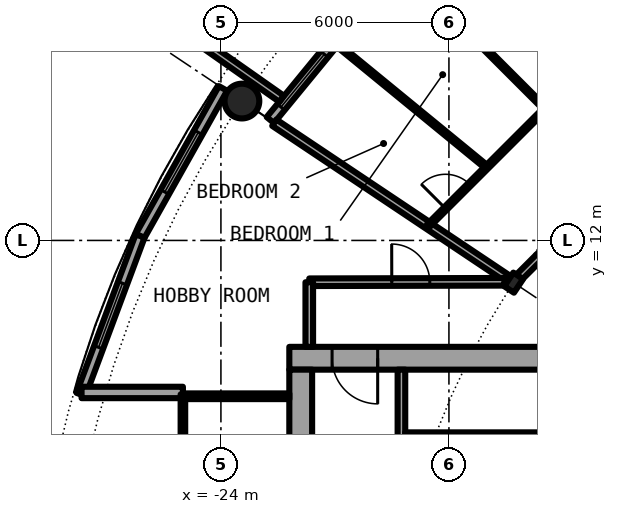
"""IFC4 building model, lengths in metres.
Left out: names, types, materials, properties, quantities, classifications, styles, units other than length and angle.
Written with IfcOpenShell. Run it as: python <this file> out.ifc"""

import sys

from ifc_helpers import new_model, si_unit, direction, frame, frame_2d, origin, origin_2d, place, context, subcontext, project, spatial, rectangle, hollow_circle, i_section, extrude, element, fill, save


model = new_model("IFC4")
c1 = context("Model", 3, precision=1e-05, world=origin(), true_north=direction((0.0, 1.0)))
c2 = subcontext(c1, "Body", "Model", "MODEL_VIEW")
j1 = project(units=[si_unit("LENGTHUNIT", "METRE"), si_unit("PLANEANGLEUNIT", "RADIAN")], contexts=[c1])
p1 = place(None, origin())
s1 = spatial("IfcSite", under=j1, at=p1, CompositionType="ELEMENT")
p2 = place(p1, origin())
s2 = spatial("IfcBuilding", under=s1, at=p2, CompositionType="ELEMENT")
p3 = place(p2, frame((0.0, 0.0, 120.8)))
s3 = spatial("IfcBuildingStorey", under=s2, at=p3, CompositionType="ELEMENT", Elevation=120.8)
p4 = place(p3, frame((-23.448, 15.667, 0.0), z_axis=(0.0, 0.0, 1.0), x_axis=(1.0, 0.0, 0.0)))
e1 = element("IfcColumn", 1, at=p4, inside=s3, PredefinedType="COLUMN", context=c2, shape_type="SweptSolid", body=[
    extrude(hollow_circle(Radius=0.457, WallThickness=0.04, at=origin_2d()), origin(), (0.0, 0.0, 1.0), 3.05),
])
p5 = place(p3, frame((-16.297, 10.889, 0.0), z_axis=(0.0, 0.0, 1.0), x_axis=(-0.831469612303, 0.55557023302, 0.0)))
e2 = element("IfcColumn", 2, at=p5, inside=s3, PredefinedType="COLUMN", context=c2, shape_type="SweptSolid", body=[
    extrude(i_section(OverallWidth=0.307, OverallDepth=0.432, WebThickness=0.021, FlangeThickness=0.04, FilletRadius=0.027, at=origin_2d()), origin(), (0.0, 0.0, 1.0), 3.05),
])
p6 = place(p3, frame((-19.304, 19.304, 0.0), z_axis=(0.0, 0.0, 1.0), x_axis=(-0.634382322723, -0.773019449054, 0.0)))
e3 = element("IfcWall", 3, at=p6, inside=s3, PredefinedType="SOLIDWALL", context=c2, shape_type="SweptSolid", body=[
    extrude(rectangle(XDim=5.352, YDim=0.25, at=frame_2d((2.676, 0.0))), origin(), (0.0, 0.0, 1.0), 2.7),
])
p7 = place(p6, frame((0.841, 0.0, 0.0)))
e4 = element("IfcOpeningElement", 4, at=p7, cuts=e3, PredefinedType="OPENING", context=c2, shape_type="SweptSolid", body=[
    extrude(rectangle(XDim=1.0, YDim=2.2, at=frame_2d((0.5, 1.1))), frame((0.0, 0.135, 0.0), z_axis=(0.0, -1.0, 0.0), x_axis=(1.0, 0.0, 0.0)), (0.0, 0.0, 1.0), 0.27),
])
p8 = place(p6, frame((3.111, 0.0, 0.3)))
e5 = element("IfcOpeningElement", 5, at=p8, cuts=e3, PredefinedType="OPENING", context=c2, shape_type="SweptSolid", body=[
    extrude(rectangle(XDim=1.8, YDim=2.1, at=frame_2d((0.9, 1.05))), frame((0.0, 0.135, 0.0), z_axis=(0.0, -1.0, 0.0), x_axis=(1.0, 0.0, 0.0)), (0.0, 0.0, 1.0), 0.27),
])
p9 = place(p3, frame((-22.402, 15.726, -0.03), z_axis=(0.0, 0.0, 1.0), x_axis=(-0.818275399393, 0.574826383135, 0.0)))
e6 = element("IfcWall", 6, at=p9, inside=s3, PredefinedType="SOLIDWALL", context=c2, shape_type="SweptSolid", body=[
    extrude(rectangle(XDim=2.929, YDim=0.2, at=frame_2d((1.465, 0.0))), origin(), (0.0, 0.0, 1.0), 2.73),
])
p10 = place(p3, frame((-23.946, 16.0, 0.0), z_axis=(0.0, 0.0, 1.0), x_axis=(-0.489696356642, -0.871893042919, 0.0)))
e7 = element("IfcWall", 7, at=p10, inside=s3, PredefinedType="SOLIDWALL", context=c2, shape_type="SweptSolid", body=[
    extrude(rectangle(XDim=4.454, YDim=0.25, at=frame_2d((2.227, 0.0))), origin(), (0.0, 0.0, 1.0), 2.7),
])
p11 = place(p10, frame((1.327, 0.0, 0.3)))
e8 = element("IfcOpeningElement", 8, at=p11, cuts=e7, PredefinedType="OPENING", context=c2, shape_type="SweptSolid", body=[
    extrude(rectangle(XDim=1.8, YDim=2.1, at=frame_2d((0.9, 1.05))), frame((0.0, 0.135, 0.0), z_axis=(0.0, -1.0, 0.0), x_axis=(1.0, 0.0, 0.0)), (0.0, 0.0, 1.0), 0.27),
])
p12 = place(p3, frame((-26.127, 12.117, 0.0), z_axis=(0.0, 0.0, 1.0), x_axis=(-0.349247811493, -0.937030397675, 0.0)))
e9 = element("IfcWall", 9, at=p12, inside=s3, PredefinedType="SOLIDWALL", context=c2, shape_type="SweptSolid", body=[
    extrude(rectangle(XDim=4.452, YDim=0.25, at=frame_2d((2.226, 0.0))), origin(), (0.0, 0.0, 1.0), 2.7),
])
p13 = place(p12, frame((1.327, 0.0, 0.3)))
e10 = element("IfcOpeningElement", 10, at=p13, cuts=e9, PredefinedType="OPENING", context=c2, shape_type="SweptSolid", body=[
    extrude(rectangle(XDim=1.8, YDim=2.1, at=frame_2d((0.9, 1.05))), frame((0.0, 0.135, 0.0), z_axis=(0.0, -1.0, 0.0), x_axis=(1.0, 0.0, 0.0)), (0.0, 0.0, 1.0), 0.27),
])
p14 = place(p3, frame((-25.0, 8.0, 0.0), z_axis=(0.0, 0.0, 1.0), x_axis=(-1.0, 0.0, 0.0)))
e11 = element("IfcWall", 11, at=p14, inside=s3, PredefinedType="SOLIDWALL", context=c2, shape_type="SweptSolid", body=[
    extrude(rectangle(XDim=2.667, YDim=0.3, at=frame_2d((1.333, 0.0))), origin(), (0.0, 0.0, 1.0), 2.7),
])
p15 = place(p3, frame((-8.4, 8.9, 0.0), z_axis=(0.0, 0.0, 1.0), x_axis=(-1.0, 0.0, 0.0)))
e12 = element("IfcWall", 12, at=p15, inside=s3, PredefinedType="SHEAR", context=c2, shape_type="SweptSolid", body=[
    extrude(rectangle(XDim=13.8, YDim=0.6, at=frame_2d((6.9, 0.0))), origin(), (0.0, 0.0, 1.0), 3.05),
])
p16 = place(p15, frame((11.475, 0.0, 0.0)))
e13 = element("IfcOpeningElement", 13, at=p16, cuts=e12, PredefinedType="OPENING", context=c2, shape_type="SweptSolid", body=[
    extrude(rectangle(XDim=1.2, YDim=2.3, at=frame_2d((0.6, 1.15))), frame((0.0, 0.31, 0.0), z_axis=(0.0, -1.0, 0.0), x_axis=(1.0, 0.0, 0.0)), (0.0, 0.0, 1.0), 0.62),
])
p17 = place(p3, frame((-21.9, -8.6, 0.0), z_axis=(0.0, 0.0, 1.0), x_axis=(0.0, 1.0, 0.0)))
e14 = element("IfcWall", 14, at=p17, inside=s3, PredefinedType="SHEAR", context=c2, shape_type="SweptSolid", body=[
    extrude(rectangle(XDim=17.2, YDim=0.6, at=frame_2d((8.6, 0.0))), origin(), (0.0, 0.0, 1.0), 3.05),
])
p18 = place(p17, frame((7.7, 0.0, 0.0)))
e15 = element("IfcOpeningElement", 15, at=p18, cuts=e14, PredefinedType="OPENING", context=c2, shape_type="SweptSolid", body=[
    extrude(rectangle(XDim=1.8, YDim=2.3, at=frame_2d((0.9, 1.15))), frame((0.0, 0.31, 0.0), z_axis=(0.0, -1.0, 0.0), x_axis=(1.0, 0.0, 0.0)), (0.0, 0.0, 1.0), 0.62),
])
p19 = place(p3, frame((-19.25, 8.6, 0.0), z_axis=(0.0, 0.0, 1.0), x_axis=(0.0, -1.0, 0.0)))
e16 = element("IfcWall", 16, at=p19, inside=s3, PredefinedType="SOLIDWALL", context=c2, shape_type="SweptSolid", body=[
    extrude(rectangle(XDim=7.025, YDim=0.2, at=frame_2d((3.513, 0.0))), origin(), (0.0, 0.0, 1.0), 2.7),
])
p20 = place(p19, frame((2.35, 0.0, 0.0)))
e17 = element("IfcOpeningElement", 17, at=p20, cuts=e16, PredefinedType="OPENING", context=c2, shape_type="SweptSolid", body=[
    extrude(rectangle(XDim=1.1, YDim=2.3, at=frame_2d((0.55, 1.15))), frame((0.0, 0.11, 0.0), z_axis=(0.0, -1.0, 0.0), x_axis=(1.0, 0.0, 0.0)), (0.0, 0.0, 1.0), 0.22),
])
p21 = place(p3, frame((-15.45, 6.875, 0.0), z_axis=(0.0, 0.0, 1.0), x_axis=(-1.0, 0.0, 0.0)))
e18 = element("IfcWall", 18, at=p21, inside=s3, PredefinedType="PARTITIONING", context=c2, shape_type="SweptSolid", body=[
    extrude(rectangle(XDim=3.7, YDim=0.15, at=frame_2d((1.85, 0.0))), origin(), (0.0, 0.0, 1.0), 2.7),
])
p22 = place(p21, frame((1.4, 0.0, 0.0)))
e19 = element("IfcOpeningElement", 19, at=p22, cuts=e18, PredefinedType="OPENING", context=c2, shape_type="SweptSolid", body=[
    extrude(rectangle(XDim=0.9, YDim=2.3, at=frame_2d((0.45, 1.15))), frame((0.0, 0.085, 0.0), z_axis=(0.0, -1.0, 0.0), x_axis=(1.0, 0.0, 0.0)), (0.0, 0.0, 1.0), 0.17),
])
p23 = place(p3, frame((-22.2, 7.9, 0.0), z_axis=(0.0, 0.0, 1.0), x_axis=(-1.0, 0.0, 0.0)))
e20 = element("IfcWall", 20, at=p23, inside=s3, PredefinedType="PARTITIONING", context=c2, shape_type="SweptSolid", body=[
    extrude(rectangle(XDim=2.74, YDim=0.15, at=frame_2d((1.37, 0.0))), origin(), (0.0, 0.0, 1.0), 2.7),
])
p24 = place(p3, frame((-25.0, 7.95, 0.0), z_axis=(0.0, 0.0, 1.0), x_axis=(0.0, -1.0, 0.0)))
e21 = element("IfcWall", 21, at=p24, inside=s3, PredefinedType="PARTITIONING", context=c2, shape_type="SweptSolid", body=[
    extrude(rectangle(XDim=15.9, YDim=0.12, at=frame_2d((7.95, 0.0))), origin(), (0.0, 0.0, 1.0), 2.7),
])
p25 = place(p24, frame((0.95, 0.0, 0.1)))
e22 = element("IfcOpeningElement", 22, at=p25, cuts=e21, PredefinedType="OPENING", context=c2, shape_type="SweptSolid", body=[
    extrude(rectangle(XDim=14.0, YDim=2.35, at=frame_2d((7.0, 1.175))), frame((0.0, 0.07, 0.0), z_axis=(0.0, -1.0, 0.0), x_axis=(1.0, 0.0, 0.0)), (0.0, 0.0, 1.0), 0.14),
])
p26 = place(p3, frame((-22.595, 15.098, 0.0), z_axis=(0.0, 0.0, 1.0), x_axis=(0.831406593008, -0.555664536482, 0.0)))
e23 = element("IfcWall", 23, at=p26, inside=s3, PredefinedType="PARTITIONING", context=c2, shape_type="SweptSolid", body=[
    extrude(rectangle(XDim=7.358, YDim=0.2, at=frame_2d((3.679, 0.0))), origin(), (0.0, 0.0, 1.0), 2.7),
])
p27 = place(p3, frame((-21.023, 17.22, 0.0), z_axis=(0.0, 0.0, 1.0), x_axis=(0.773517471898, -0.633774976367, 0.0)))
e24 = element("IfcWall", 24, at=p27, inside=s3, PredefinedType="PARTITIONING", context=c2, shape_type="SweptSolid", body=[
    extrude(rectangle(XDim=5.196, YDim=0.1, at=frame_2d((2.598, 0.0))), origin(), (0.0, 0.0, 1.0), 2.7),
])
p28 = place(p3, frame((-19.216, 19.216, 0.0), z_axis=(0.0, 0.0, 1.0), x_axis=(0.707106781187, -0.707106781187, 0.0)))
e25 = element("IfcWall", 25, at=p28, inside=s3, PredefinedType="PARTITIONING", context=c2, shape_type="SweptSolid", body=[
    extrude(rectangle(XDim=5.305, YDim=0.1, at=frame_2d((2.652, 0.0))), origin(), (0.0, 0.0, 1.0), 2.7),
])
p29 = place(p28, frame((2.202, 0.0, 0.0)))
e26 = element("IfcOpeningElement", 26, at=p29, cuts=e25, PredefinedType="OPENING", context=c2, shape_type="SweptSolid", body=[
    extrude(rectangle(XDim=0.9, YDim=2.3, at=frame_2d((0.45, 1.15))), frame((0.0, 0.06, 0.0), z_axis=(0.0, -1.0, 0.0), x_axis=(1.0, 0.0, 0.0)), (0.0, 0.0, 1.0), 0.12),
])
p30 = place(p3, frame((-21.675, 10.9, 0.0), z_axis=(0.0, 0.0, 1.0), x_axis=(0.999997173357, 0.002377662213, 0.0)))
e27 = element("IfcWall", 27, at=p30, inside=s3, PredefinedType="PARTITIONING", context=c2, shape_type="SweptSolid", body=[
    extrude(rectangle(XDim=5.134, YDim=0.2, at=frame_2d((2.567, 0.0))), origin(), (0.0, 0.0, 1.0), 2.7),
])
p31 = place(p30, frame((2.171, 0.0, 0.0)))
e28 = element("IfcOpeningElement", 28, at=p31, cuts=e27, PredefinedType="OPENING", context=c2, shape_type="SweptSolid", body=[
    extrude(rectangle(XDim=1.0, YDim=2.3, at=frame_2d((0.5, 1.15))), frame((0.0, 0.11, 0.0), z_axis=(0.0, -1.0, 0.0), x_axis=(1.0, 0.0, 0.0)), (0.0, 0.0, 1.0), 0.22),
])
p32 = place(p3, frame((-16.186, 11.0, 0.0), z_axis=(0.0, 0.0, 1.0), x_axis=(0.707106781187, 0.707106781187, 0.0)))
e29 = element("IfcWall", 29, at=p32, inside=s3, PredefinedType="PARTITIONING", context=c2, shape_type="SweptSolid", body=[
    extrude(rectangle(XDim=7.334, YDim=0.2, at=frame_2d((3.667, 0.0))), origin(), (0.0, 0.0, 1.0), 2.39),
])
p33 = place(p32, frame((2.211, 0.0, 0.0)))
e30 = element("IfcOpeningElement", 30, at=p33, cuts=e29, PredefinedType="OPENING", context=c2, shape_type="SweptSolid", body=[
    extrude(rectangle(XDim=1.0, YDim=2.3, at=frame_2d((0.5, 1.15))), frame((0.0, 0.11, 0.0), z_axis=(0.0, -1.0, 0.0), x_axis=(1.0, 0.0, 0.0)), (0.0, 0.0, 1.0), 0.22),
])
p34 = place(p3, frame((-21.675, 9.2, 0.0), z_axis=(0.0, 0.0, 1.0), x_axis=(0.0, 1.0, 0.0)))
e31 = element("IfcWall", 31, at=p34, inside=s3, PredefinedType="PARTITIONING", context=c2, shape_type="SweptSolid", body=[
    extrude(rectangle(XDim=1.7, YDim=0.2, at=frame_2d((0.85, 0.0))), origin(), (0.0, 0.0, 1.0), 2.7),
])
p35 = place(p3, frame((-18.542, 12.389, 0.0), z_axis=(0.0, 0.0, 1.0), x_axis=(0.707190945535, 0.707022606819, 0.0)))
e32 = element("IfcWall", 32, at=p35, inside=s3, PredefinedType="PARTITIONING", context=c2, shape_type="SweptSolid", body=[
    extrude(rectangle(XDim=4.351, YDim=0.1, at=frame_2d((2.175, 0.0))), origin(), (0.0, 0.0, 1.0), 2.7),
])
p36 = place(p35, frame((0.639, 0.0, 0.0)))
e33 = element("IfcOpeningElement", 33, at=p36, cuts=e32, PredefinedType="OPENING", context=c2, shape_type="SweptSolid", body=[
    extrude(rectangle(XDim=0.9, YDim=2.3, at=frame_2d((0.45, 1.15))), frame((0.0, 0.06, 0.0), z_axis=(0.0, -1.0, 0.0), x_axis=(1.0, 0.0, 0.0)), (0.0, 0.0, 1.0), 0.12),
])
p37 = place(p8, origin())
e34 = element("IfcWindow", 34, at=p37, inside=s3, PartitioningType="SINGLE_PANEL", PredefinedType="WINDOW", context=c2, shape_type="SweptSolid", body=[
    extrude(rectangle(XDim=1.8, YDim=2.1, at=frame_2d((0.9, 1.05))), frame((0.0, 0.03, 0.0), z_axis=(0.0, -1.0, 0.0), x_axis=(1.0, 0.0, 0.0)), (0.0, 0.0, 1.0), 0.06),
])
fill(e5, e34)
p38 = place(p11, origin())
e35 = element("IfcWindow", 35, at=p38, inside=s3, PartitioningType="SINGLE_PANEL", PredefinedType="WINDOW", context=c2, shape_type="SweptSolid", body=[
    extrude(rectangle(XDim=1.8, YDim=2.1, at=frame_2d((0.9, 1.05))), frame((0.0, 0.03, 0.0), z_axis=(0.0, -1.0, 0.0), x_axis=(1.0, 0.0, 0.0)), (0.0, 0.0, 1.0), 0.06),
])
fill(e8, e35)
p39 = place(p13, origin())
e36 = element("IfcWindow", 36, at=p39, inside=s3, PartitioningType="SINGLE_PANEL", PredefinedType="WINDOW", context=c2, shape_type="SweptSolid", body=[
    extrude(rectangle(XDim=1.8, YDim=2.1, at=frame_2d((0.9, 1.05))), frame((0.0, 0.03, 0.0), z_axis=(0.0, -1.0, 0.0), x_axis=(1.0, 0.0, 0.0)), (0.0, 0.0, 1.0), 0.06),
])
fill(e10, e36)
p40 = place(p22, origin())
e37 = element("IfcDoor", 37, at=p40, inside=s3, OperationType="SINGLE_SWING_LEFT", PredefinedType="DOOR", context=c2, shape_type="SweptSolid", body=[
    extrude(rectangle(XDim=0.9, YDim=2.3, at=frame_2d((0.45, 1.15))), frame((0.0, 0.025, 0.0), z_axis=(0.0, -1.0, 0.0), x_axis=(1.0, 0.0, 0.0)), (0.0, 0.0, 1.0), 0.05),
])
fill(e19, e37)
p41 = place(p16, origin())
e38 = element("IfcDoor", 38, at=p41, inside=s3, OperationType="SINGLE_SWING_LEFT", PredefinedType="DOOR", context=c2, shape_type="SweptSolid", body=[
    extrude(rectangle(XDim=1.2, YDim=2.3, at=frame_2d((0.6, 1.15))), frame((0.0, 0.025, 0.0), z_axis=(0.0, -1.0, 0.0), x_axis=(1.0, 0.0, 0.0)), (0.0, 0.0, 1.0), 0.05),
])
fill(e13, e38)
p42 = place(p25, origin())
e39 = element("IfcWindow", 39, at=p42, inside=s3, PartitioningType="SINGLE_PANEL", PredefinedType="WINDOW", context=c2, shape_type="SweptSolid", body=[
    extrude(rectangle(XDim=14.0, YDim=2.35, at=frame_2d((7.0, 1.175))), frame((0.0, 0.03, 0.0), z_axis=(0.0, -1.0, 0.0), x_axis=(1.0, 0.0, 0.0)), (0.0, 0.0, 1.0), 0.06),
])
fill(e22, e39)
p43 = place(p36, origin())
e40 = element("IfcDoor", 40, at=p43, inside=s3, OperationType="SINGLE_SWING_LEFT", PredefinedType="DOOR", context=c2, shape_type="SweptSolid", body=[
    extrude(rectangle(XDim=0.9, YDim=2.3, at=frame_2d((0.45, 1.15))), frame((0.0, 0.025, 0.0), z_axis=(0.0, -1.0, 0.0), x_axis=(1.0, 0.0, 0.0)), (0.0, 0.0, 1.0), 0.05),
])
fill(e33, e40)
p44 = place(p31, origin())
e41 = element("IfcDoor", 41, at=p44, inside=s3, OperationType="SINGLE_SWING_RIGHT", PredefinedType="DOOR", context=c2, shape_type="SweptSolid", body=[
    extrude(rectangle(XDim=1.0, YDim=2.3, at=frame_2d((0.5, 1.15))), frame((0.0, 0.025, 0.0), z_axis=(0.0, -1.0, 0.0), x_axis=(1.0, 0.0, 0.0)), (0.0, 0.0, 1.0), 0.05),
])
fill(e28, e41)
save(model, sys.argv[1])
